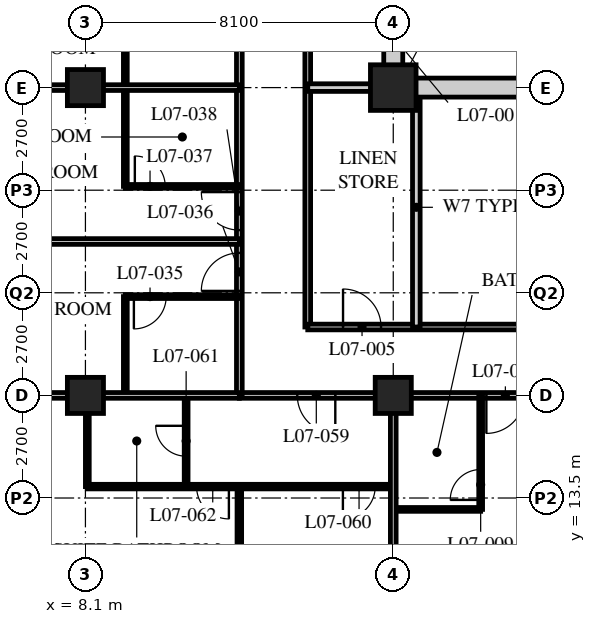
"""IFC4 building model, lengths in metres.
Left out: names, types, materials, properties, quantities, classifications, styles, units other than length and angle.
Written with IfcOpenShell. Run it as: python <this file> out.ifc"""

import sys

from ifc_helpers import new_model, si_unit, direction, frame, frame_2d, origin, origin_2d, place, context, subcontext, project, spatial, rectangle, hollow_rectangle, extrude, element, fill, save


model = new_model("IFC4")
c1 = context("Model", 3, precision=1e-05, world=origin(), true_north=direction((0.0, 1.0)))
c2 = subcontext(c1, "Body", "Model", "MODEL_VIEW")
j1 = project(units=[si_unit("LENGTHUNIT", "METRE"), si_unit("PLANEANGLEUNIT", "RADIAN")], contexts=[c1])
p1 = place(None, origin())
s1 = spatial("IfcSite", under=j1, at=p1, CompositionType="ELEMENT")
p2 = place(p1, origin())
s2 = spatial("IfcBuilding", under=s1, at=p2, CompositionType="ELEMENT")
p3 = place(p2, frame((0.0, 0.0, 36.4)))
s3 = spatial("IfcBuildingStorey", under=s2, at=p3, CompositionType="ELEMENT", Elevation=36.4)
for number, where, z_axis, x_axis in (
    (1, (8.1, 16.2, 0.0), (0.0, 0.0, 1.0), (1.0, 0.0, 0.0)),
    (2, (8.1, 24.3, 0.0), (0.0, 0.0, 1.0), (1.0, 0.0, 0.0)),
    (3, (16.2, 16.2, 0.0), (0.0, 0.0, 1.0), (1.0, 0.0, 0.0)),
):
    element("IfcColumn", number, at=place(p3, frame(where, z_axis=z_axis, x_axis=x_axis)), inside=s3, PredefinedType="COLUMN", context=c2, shape_type="SweptSolid", body=[
        extrude(hollow_rectangle(XDim=0.95, YDim=0.95, WallThickness=0.095, at=origin_2d()), origin(), (0.0, 0.0, 1.0), 3.4),
    ])
p4 = place(p3, frame((16.2, 24.3, 0.0), z_axis=(0.0, 0.0, 1.0), x_axis=(1.0, 0.0, 0.0)))
e4 = element("IfcColumn", 4, at=p4, inside=s3, PredefinedType="COLUMN", context=c2, shape_type="SweptSolid", body=[
    extrude(hollow_rectangle(XDim=1.2, YDim=1.2, WallThickness=0.12, at=origin_2d()), origin(), (0.0, 0.0, 1.0), 3.4),
])
p5 = place(p3, frame((12.15, 16.2, 0.0), z_axis=(0.0, 0.0, 1.0), x_axis=(1.0, 0.0, 0.0)))
e5 = element("IfcWall", 5, at=p5, inside=s3, PredefinedType="PARTITIONING", context=c2, shape_type="SweptSolid", body=[
    extrude(rectangle(XDim=32.4, YDim=0.15, at=frame_2d((16.2, 0.0))), origin(), (0.0, 0.0, 1.0), 2.578),
])
p6 = place(p5, frame((6.5, 0.0, 0.0)))
e6 = element("IfcOpeningElement", 6, at=p6, cuts=e5, PredefinedType="OPENING", context=c2, shape_type="SweptSolid", body=[
    extrude(rectangle(XDim=1.0, YDim=2.1, at=frame_2d((0.5, 1.05))), frame((0.0, 0.085, 0.0), z_axis=(0.0, -1.0, 0.0), x_axis=(1.0, 0.0, 0.0)), (0.0, 0.0, 1.0), 0.17),
])
p7 = place(p5, frame((8.4, 0.0, 0.0)))
e7 = element("IfcOpeningElement", 7, at=p7, cuts=e5, PredefinedType="OPENING", context=c2, shape_type="SweptSolid", body=[
    extrude(rectangle(XDim=1.0, YDim=2.1, at=frame_2d((0.5, 1.05))), frame((0.0, 0.085, 0.0), z_axis=(0.0, -1.0, 0.0), x_axis=(1.0, 0.0, 0.0)), (0.0, 0.0, 1.0), 0.17),
])
p8 = place(p5, frame((14.6, 0.0, 0.0)))
e8 = element("IfcOpeningElement", 8, at=p8, cuts=e5, PredefinedType="OPENING", context=c2, shape_type="SweptSolid", body=[
    extrude(rectangle(XDim=1.0, YDim=2.1, at=frame_2d((0.5, 1.05))), frame((0.0, 0.085, 0.0), z_axis=(0.0, -1.0, 0.0), x_axis=(1.0, 0.0, 0.0)), (0.0, 0.0, 1.0), 0.17),
])
p9 = place(p5, frame((16.5, 0.0, 0.0)))
e9 = element("IfcOpeningElement", 9, at=p9, cuts=e5, PredefinedType="OPENING", context=c2, shape_type="SweptSolid", body=[
    extrude(rectangle(XDim=1.0, YDim=2.1, at=frame_2d((0.5, 1.05))), frame((0.0, 0.085, 0.0), z_axis=(0.0, -1.0, 0.0), x_axis=(1.0, 0.0, 0.0)), (0.0, 0.0, 1.0), 0.17),
])
p10 = place(p5, frame((23.0, 0.0, 0.0)))
e10 = element("IfcOpeningElement", 10, at=p10, cuts=e5, PredefinedType="OPENING", context=c2, shape_type="SweptSolid", body=[
    extrude(rectangle(XDim=1.0, YDim=2.1, at=frame_2d((0.5, 1.05))), frame((0.0, 0.085, 0.0), z_axis=(0.0, -1.0, 0.0), x_axis=(1.0, 0.0, 0.0)), (0.0, 0.0, 1.0), 0.17),
])
p11 = place(p5, frame((24.6, 0.0, 0.0)))
e11 = element("IfcOpeningElement", 11, at=p11, cuts=e5, PredefinedType="OPENING", context=c2, shape_type="SweptSolid", body=[
    extrude(rectangle(XDim=1.0, YDim=2.1, at=frame_2d((0.5, 1.05))), frame((0.0, 0.085, 0.0), z_axis=(0.0, -1.0, 0.0), x_axis=(1.0, 0.0, 0.0)), (0.0, 0.0, 1.0), 0.17),
])
p12 = place(p5, frame((1.525, 0.0, 0.0)))
e12 = element("IfcOpeningElement", 12, at=p12, cuts=e5, PredefinedType="OPENING", context=c2, shape_type="SweptSolid", body=[
    extrude(rectangle(XDim=1.0, YDim=2.1, at=frame_2d((0.5, 1.05))), frame((0.0, 0.085, 0.0), z_axis=(0.0, -1.0, 0.0), x_axis=(1.0, 0.0, 0.0)), (0.0, 0.0, 1.0), 0.17),
])
p13 = place(p5, frame((29.875, 0.0, 0.0)))
e13 = element("IfcOpeningElement", 13, at=p13, cuts=e5, PredefinedType="OPENING", context=c2, shape_type="SweptSolid", body=[
    extrude(rectangle(XDim=1.0, YDim=2.1, at=frame_2d((0.5, 1.05))), frame((0.0, 0.085, 0.0), z_axis=(0.0, -1.0, 0.0), x_axis=(1.0, 0.0, 0.0)), (0.0, 0.0, 1.0), 0.17),
])
p14 = place(p3, frame((12.15, 16.2, 0.0), z_axis=(0.0, 0.0, 1.0), x_axis=(0.0, 1.0, 0.0)))
e14 = element("IfcWall", 14, at=p14, inside=s3, PredefinedType="PARTITIONING", context=c2, shape_type="SweptSolid", body=[
    extrude(rectangle(XDim=26.1, YDim=0.15, at=frame_2d((13.05, 0.0))), origin(), (0.0, 0.0, 1.0), 3.19),
])
p15 = place(p14, frame((2.75, 0.0, 0.0)))
e15 = element("IfcOpeningElement", 15, at=p15, cuts=e14, PredefinedType="OPENING", context=c2, shape_type="SweptSolid", body=[
    extrude(rectangle(XDim=1.0, YDim=2.1, at=frame_2d((0.5, 1.05))), frame((0.0, 0.085, 0.0), z_axis=(0.0, -1.0, 0.0), x_axis=(1.0, 0.0, 0.0)), (0.0, 0.0, 1.0), 0.17),
])
p16 = place(p14, frame((4.35, 0.0, 0.0)))
e16 = element("IfcOpeningElement", 16, at=p16, cuts=e14, PredefinedType="OPENING", context=c2, shape_type="SweptSolid", body=[
    extrude(rectangle(XDim=1.0, YDim=2.1, at=frame_2d((0.5, 1.05))), frame((0.0, 0.085, 0.0), z_axis=(0.0, -1.0, 0.0), x_axis=(1.0, 0.0, 0.0)), (0.0, 0.0, 1.0), 0.17),
])
p17 = place(p14, frame((10.55, 0.0, 0.0)))
e17 = element("IfcOpeningElement", 17, at=p17, cuts=e14, PredefinedType="OPENING", context=c2, shape_type="SweptSolid", body=[
    extrude(rectangle(XDim=1.0, YDim=2.1, at=frame_2d((0.5, 1.05))), frame((0.0, 0.085, 0.0), z_axis=(0.0, -1.0, 0.0), x_axis=(1.0, 0.0, 0.0)), (0.0, 0.0, 1.0), 0.17),
])
p18 = place(p14, frame((12.45, 0.0, 0.0)))
e18 = element("IfcOpeningElement", 18, at=p18, cuts=e14, PredefinedType="OPENING", context=c2, shape_type="SweptSolid", body=[
    extrude(rectangle(XDim=1.0, YDim=2.1, at=frame_2d((0.5, 1.05))), frame((0.0, 0.085, 0.0), z_axis=(0.0, -1.0, 0.0), x_axis=(1.0, 0.0, 0.0)), (0.0, 0.0, 1.0), 0.17),
])
p19 = place(p14, frame((18.65, 0.0, 0.0)))
e19 = element("IfcOpeningElement", 19, at=p19, cuts=e14, PredefinedType="OPENING", context=c2, shape_type="SweptSolid", body=[
    extrude(rectangle(XDim=1.0, YDim=2.1, at=frame_2d((0.5, 1.05))), frame((0.0, 0.085, 0.0), z_axis=(0.0, -1.0, 0.0), x_axis=(1.0, 0.0, 0.0)), (0.0, 0.0, 1.0), 0.17),
])
p20 = place(p14, frame((22.65, 0.0, 0.0)))
e20 = element("IfcOpeningElement", 20, at=p20, cuts=e14, PredefinedType="OPENING", context=c2, shape_type="SweptSolid", body=[
    extrude(rectangle(XDim=1.0, YDim=2.1, at=frame_2d((0.5, 1.05))), frame((0.0, 0.085, 0.0), z_axis=(0.0, -1.0, 0.0), x_axis=(1.0, 0.0, 0.0)), (0.0, 0.0, 1.0), 0.17),
])
p21 = place(p3, frame((13.95, 40.5, 0.0), z_axis=(0.0, 0.0, 1.0), x_axis=(0.0, -1.0, 0.0)))
e21 = element("IfcWall", 21, at=p21, inside=s3, PredefinedType="PARTITIONING", context=c2, shape_type="SweptSolid", body=[
    extrude(rectangle(XDim=22.5, YDim=0.15, at=frame_2d((11.25, 0.0))), origin(), (0.0, 0.0, 1.0), 3.19),
])
p22 = place(p21, frame((11.65, 0.0, 0.0)))
e22 = element("IfcOpeningElement", 22, at=p22, cuts=e21, PredefinedType="OPENING", context=c2, shape_type="SweptSolid", body=[
    extrude(rectangle(XDim=1.0, YDim=2.1, at=frame_2d((0.5, 1.05))), frame((0.0, 0.085, 0.0), z_axis=(0.0, -1.0, 0.0), x_axis=(1.0, 0.0, 0.0)), (0.0, 0.0, 1.0), 0.17),
])
p23 = place(p21, frame((3.55, 0.0, 0.0)))
e23 = element("IfcOpeningElement", 23, at=p23, cuts=e21, PredefinedType="OPENING", context=c2, shape_type="SweptSolid", body=[
    extrude(rectangle(XDim=1.0, YDim=2.1, at=frame_2d((0.5, 1.05))), frame((0.0, 0.085, 0.0), z_axis=(0.0, -1.0, 0.0), x_axis=(1.0, 0.0, 0.0)), (0.0, 0.0, 1.0), 0.17),
])
p24 = place(p3, frame((13.95, 18.0, 0.0), z_axis=(0.0, 0.0, 1.0), x_axis=(1.0, 0.0, 0.0)))
e24 = element("IfcWall", 24, at=p24, inside=s3, PredefinedType="PARTITIONING", context=c2, shape_type="SweptSolid", body=[
    extrude(rectangle(XDim=13.19, YDim=0.15, at=frame_2d((6.595, 0.0))), origin(), (0.0, 0.0, 1.0), 3.19),
])
p25 = place(p24, frame((0.929, 0.0, 0.0)))
e25 = element("IfcOpeningElement", 25, at=p25, cuts=e24, PredefinedType="OPENING", context=c2, shape_type="SweptSolid", body=[
    extrude(rectangle(XDim=1.0, YDim=2.1, at=frame_2d((0.5, 1.05))), frame((0.0, 0.085, 0.0), z_axis=(0.0, -1.0, 0.0), x_axis=(1.0, 0.0, 0.0)), (0.0, 0.0, 1.0), 0.17),
])
p26 = place(p24, frame((7.529, 0.0, 0.0)))
e26 = element("IfcOpeningElement", 26, at=p26, cuts=e24, PredefinedType="OPENING", context=c2, shape_type="SweptSolid", body=[
    extrude(rectangle(XDim=1.0, YDim=2.1, at=frame_2d((0.5, 1.05))), frame((0.0, 0.085, 0.0), z_axis=(0.0, -1.0, 0.0), x_axis=(1.0, 0.0, 0.0)), (0.0, 0.0, 1.0), 0.17),
])
p27 = place(p3, frame((16.807, 18.0, 0.0), z_axis=(0.0, 0.0, 1.0), x_axis=(0.0, 1.0, 0.0)))
e27 = element("IfcWall", 27, at=p27, inside=s3, PredefinedType="SOLIDWALL", context=c2, shape_type="SweptSolid", body=[
    extrude(rectangle(XDim=6.3, YDim=0.2, at=frame_2d((3.15, 0.0))), origin(), (0.0, 0.0, 1.0), 3.19),
])
p28 = place(p3, frame((13.95, 24.3, 0.0), z_axis=(0.0, 0.0, 1.0), x_axis=(1.0, 0.0, 0.0)))
e28 = element("IfcWall", 28, at=p28, inside=s3, PredefinedType="SOLIDWALL", context=c2, shape_type="SweptSolid", body=[
    extrude(rectangle(XDim=2.25, YDim=0.2, at=frame_2d((1.125, 0.0))), origin(), (0.0, 0.0, 1.0), 2.578),
])
p29 = place(p3, frame((16.2, 13.2, 0.0), z_axis=(0.0, 0.0, 1.0), x_axis=(1.0, 0.0, 0.0)))
e29 = element("IfcWall", 29, at=p29, inside=s3, PredefinedType="PARTITIONING", context=c2, shape_type="SweptSolid", body=[
    extrude(rectangle(XDim=2.3, YDim=0.1, at=frame_2d((1.15, 0.0))), origin(), (0.0, 0.0, 1.0), 3.19),
])
p30 = place(p3, frame((18.5, 16.2, 0.0), z_axis=(0.0, 0.0, 1.0), x_axis=(0.0, -1.0, 0.0)))
e30 = element("IfcWall", 30, at=p30, inside=s3, PredefinedType="PARTITIONING", context=c2, shape_type="SweptSolid", body=[
    extrude(rectangle(XDim=3.0, YDim=0.1, at=frame_2d((1.5, 0.0))), origin(), (0.0, 0.0, 1.0), 3.19),
])
p31 = place(p30, frame((1.95, 0.0, 0.0)))
e31 = element("IfcOpeningElement", 31, at=p31, cuts=e30, PredefinedType="OPENING", context=c2, shape_type="SweptSolid", body=[
    extrude(rectangle(XDim=0.8, YDim=2.1, at=frame_2d((0.4, 1.05))), frame((0.0, 0.06, 0.0), z_axis=(0.0, -1.0, 0.0), x_axis=(1.0, 0.0, 0.0)), (0.0, 0.0, 1.0), 0.12),
])
p32 = place(p3, frame((9.15, 16.2, 0.0), z_axis=(0.0, 0.0, 1.0), x_axis=(0.0, 1.0, 0.0)))
e32 = element("IfcWall", 32, at=p32, inside=s3, PredefinedType="PARTITIONING", context=c2, shape_type="SweptSolid", body=[
    extrude(rectangle(XDim=2.6, YDim=0.1, at=frame_2d((1.3, 0.0))), origin(), (0.0, 0.0, 1.0), 3.19),
])
p33 = place(p3, frame((12.15, 18.8, 0.0), z_axis=(0.0, 0.0, 1.0), x_axis=(-1.0, 0.0, 0.0)))
e33 = element("IfcWall", 33, at=p33, inside=s3, PredefinedType="PARTITIONING", context=c2, shape_type="SweptSolid", body=[
    extrude(rectangle(XDim=3.0, YDim=0.1, at=frame_2d((1.5, 0.0))), origin(), (0.0, 0.0, 1.0), 3.19),
])
p34 = place(p33, frame((1.925, 0.0, 0.0)))
e34 = element("IfcOpeningElement", 34, at=p34, cuts=e33, PredefinedType="OPENING", context=c2, shape_type="SweptSolid", body=[
    extrude(rectangle(XDim=0.85, YDim=2.1, at=frame_2d((0.425, 1.05))), frame((0.0, 0.06, 0.0), z_axis=(0.0, -1.0, 0.0), x_axis=(1.0, 0.0, 0.0)), (0.0, 0.0, 1.0), 0.12),
])
p35 = place(p3, frame((12.15, 20.25, 0.0), z_axis=(0.0, 0.0, 1.0), x_axis=(-1.0, 0.0, 0.0)))
e35 = element("IfcWall", 35, at=p35, inside=s3, PredefinedType="PARTITIONING", context=c2, shape_type="SweptSolid", body=[
    extrude(rectangle(XDim=11.85, YDim=0.15, at=frame_2d((5.925, 0.0))), origin(), (0.0, 0.0, 1.0), 3.19),
])
p36 = place(p3, frame((9.15, 21.7, 0.0), z_axis=(0.0, 0.0, 1.0), x_axis=(0.0, 1.0, 0.0)))
e36 = element("IfcWall", 36, at=p36, inside=s3, PredefinedType="PARTITIONING", context=c2, shape_type="SweptSolid", body=[
    extrude(rectangle(XDim=4.9, YDim=0.1, at=frame_2d((2.45, 0.0))), origin(), (0.0, 0.0, 1.0), 3.19),
])
p37 = place(p3, frame((12.15, 21.7, 0.0), z_axis=(0.0, 0.0, 1.0), x_axis=(-1.0, 0.0, 0.0)))
e37 = element("IfcWall", 37, at=p37, inside=s3, PredefinedType="PARTITIONING", context=c2, shape_type="SweptSolid", body=[
    extrude(rectangle(XDim=3.0, YDim=0.1, at=frame_2d((1.5, 0.0))), origin(), (0.0, 0.0, 1.0), 3.19),
])
p38 = place(p37, frame((1.95, 0.0, 0.0)))
e38 = element("IfcOpeningElement", 38, at=p38, cuts=e37, PredefinedType="OPENING", context=c2, shape_type="SweptSolid", body=[
    extrude(rectangle(XDim=0.8, YDim=2.1, at=frame_2d((0.4, 1.05))), frame((0.0, 0.06, 0.0), z_axis=(0.0, -1.0, 0.0), x_axis=(1.0, 0.0, 0.0)), (0.0, 0.0, 1.0), 0.12),
])
p39 = place(p3, frame((12.15, 24.3, 0.0), z_axis=(0.0, 0.0, 1.0), x_axis=(-1.0, 0.0, 0.0)))
e39 = element("IfcWall", 39, at=p39, inside=s3, PredefinedType="PARTITIONING", context=c2, shape_type="SweptSolid", body=[
    extrude(rectangle(XDim=11.85, YDim=0.15, at=frame_2d((5.925, 0.0))), origin(), (0.0, 0.0, 1.0), 2.578),
])
p40 = place(p3, frame((10.75, 16.2, 0.0), z_axis=(0.0, 0.0, 1.0), x_axis=(0.0, -1.0, 0.0)))
e40 = element("IfcWall", 40, at=p40, inside=s3, PredefinedType="PARTITIONING", context=c2, shape_type="SweptSolid", body=[
    extrude(rectangle(XDim=2.4, YDim=0.1, at=frame_2d((1.2, 0.0))), origin(), (0.0, 0.0, 1.0), 3.19),
])
p41 = place(p40, frame((0.8, 0.0, 0.0)))
e41 = element("IfcOpeningElement", 41, at=p41, cuts=e40, PredefinedType="OPENING", context=c2, shape_type="SweptSolid", body=[
    extrude(rectangle(XDim=0.8, YDim=2.1, at=frame_2d((0.4, 1.05))), frame((0.0, 0.06, 0.0), z_axis=(0.0, -1.0, 0.0), x_axis=(1.0, 0.0, 0.0)), (0.0, 0.0, 1.0), 0.12),
])
p42 = place(p3, frame((8.15, 16.2, 0.0), z_axis=(0.0, 0.0, 1.0), x_axis=(0.0, -1.0, 0.0)))
e42 = element("IfcWall", 42, at=p42, inside=s3, PredefinedType="PARTITIONING", context=c2, shape_type="SweptSolid", body=[
    extrude(rectangle(XDim=2.4, YDim=0.1, at=frame_2d((1.2, 0.0))), origin(), (0.0, 0.0, 1.0), 2.578),
])
p43 = place(p3, frame((8.15, 13.8, 0.0), z_axis=(0.0, 0.0, 1.0), x_axis=(1.0, 0.0, 0.0)))
e43 = element("IfcWall", 43, at=p43, inside=s3, PredefinedType="PARTITIONING", context=c2, shape_type="SweptSolid", body=[
    extrude(rectangle(XDim=8.05, YDim=0.12, at=frame_2d((4.025, 0.0))), origin(), (0.0, 0.0, 1.0), 3.19),
])
p44 = place(p43, frame((6.725, 0.0, 0.0)))
e44 = element("IfcOpeningElement", 44, at=p44, cuts=e43, PredefinedType="OPENING", context=c2, shape_type="SweptSolid", body=[
    extrude(rectangle(XDim=0.85, YDim=2.1, at=frame_2d((0.425, 1.05))), frame((0.0, 0.07, 0.0), z_axis=(0.0, -1.0, 0.0), x_axis=(1.0, 0.0, 0.0)), (0.0, 0.0, 1.0), 0.14),
])
p45 = place(p43, frame((2.875, 0.0, 0.0)))
e45 = element("IfcOpeningElement", 45, at=p45, cuts=e43, PredefinedType="OPENING", context=c2, shape_type="SweptSolid", body=[
    extrude(rectangle(XDim=0.85, YDim=2.1, at=frame_2d((0.425, 1.05))), frame((0.0, 0.07, 0.0), z_axis=(0.0, -1.0, 0.0), x_axis=(1.0, 0.0, 0.0)), (0.0, 0.0, 1.0), 0.14),
])
p46 = place(p3, frame((12.15, 13.8, 0.0), z_axis=(0.0, 0.0, 1.0), x_axis=(0.0, -1.0, 0.0)))
e46 = element("IfcWall", 46, at=p46, inside=s3, PredefinedType="PARTITIONING", context=c2, shape_type="SweptSolid", body=[
    extrude(rectangle(XDim=13.5, YDim=0.12, at=frame_2d((6.75, 0.0))), origin(), (0.0, 0.0, 1.0), 3.19),
])
p47 = place(p3, frame((0.3, 16.2, 0.0), z_axis=(0.0, 0.0, 1.0), x_axis=(1.0, 0.0, 0.0)))
e47 = element("IfcWall", 47, at=p47, inside=s3, PredefinedType="PARTITIONING", context=c2, shape_type="SweptSolid", body=[
    extrude(rectangle(XDim=11.85, YDim=0.15, at=frame_2d((5.925, 0.0))), origin(), (0.0, 0.0, 1.0), 2.578),
])
p48 = place(p3, frame((16.2, 16.2, 0.0), z_axis=(0.0, 0.0, 1.0), x_axis=(0.0, -1.0, 0.0)))
e48 = element("IfcWall", 48, at=p48, inside=s3, PredefinedType="PARTITIONING", context=c2, shape_type="SweptSolid", body=[
    extrude(rectangle(XDim=15.9, YDim=0.15, at=frame_2d((7.95, 0.0))), origin(), (0.0, 0.0, 1.0), 2.578),
])
p49 = place(p3, frame((15.95, 24.3, 0.0), z_axis=(0.0, 0.0, 1.0), x_axis=(1.0, 0.0, 0.0)))
e49 = element("IfcWall", 49, at=p49, inside=s3, PredefinedType="SOLIDWALL", context=c2, shape_type="SweptSolid", body=[
    extrude(rectangle(XDim=24.8, YDim=0.5, at=frame_2d((12.4, 0.0))), origin(), (0.0, 0.0, 1.0), 2.54),
])
p50 = place(p49, frame((11.5, 0.0, 0.0)))
e50 = element("IfcOpeningElement", 50, at=p50, cuts=e49, PredefinedType="OPENING", context=c2, shape_type="SweptSolid", body=[
    extrude(rectangle(XDim=1.8, YDim=2.4, at=frame_2d((0.9, 1.2))), frame((0.0, 0.26, 0.0), z_axis=(0.0, -1.0, 0.0), x_axis=(1.0, 0.0, 0.0)), (0.0, 0.0, 1.0), 0.52),
])
p51 = place(p3, frame((16.2, 24.55, 0.0), z_axis=(0.0, 0.0, 1.0), x_axis=(0.0, 1.0, 0.0)))
e51 = element("IfcWall", 51, at=p51, inside=s3, PredefinedType="SOLIDWALL", context=c2, shape_type="SweptSolid", body=[
    extrude(rectangle(XDim=15.7, YDim=0.5, at=frame_2d((7.85, 0.0))), origin(), (0.0, 0.0, 1.0), 2.578),
])
p52 = place(p25, origin())
e52 = element("IfcDoor", 52, at=p52, inside=s3, OperationType="SINGLE_SWING_LEFT", PredefinedType="DOOR", context=c2, shape_type="SweptSolid", body=[
    extrude(rectangle(XDim=1.0, YDim=2.1, at=frame_2d((0.5, 1.05))), frame((0.0, 0.025, 0.0), z_axis=(0.0, -1.0, 0.0), x_axis=(1.0, 0.0, 0.0)), (0.0, 0.0, 1.0), 0.05),
])
fill(e25, e52)
p53 = place(p31, origin())
e53 = element("IfcDoor", 53, at=p53, inside=s3, OperationType="SINGLE_SWING_LEFT", PredefinedType="DOOR", context=c2, shape_type="SweptSolid", body=[
    extrude(rectangle(XDim=0.8, YDim=2.1, at=frame_2d((0.4, 1.05))), frame((0.0, 0.025, 0.0), z_axis=(0.0, -1.0, 0.0), x_axis=(1.0, 0.0, 0.0)), (0.0, 0.0, 1.0), 0.05),
])
fill(e31, e53)
p54 = place(p6, origin())
e54 = element("IfcDoor", 54, at=p54, inside=s3, OperationType="SINGLE_SWING_RIGHT", PredefinedType="DOOR", context=c2, shape_type="SweptSolid", body=[
    extrude(rectangle(XDim=1.0, YDim=2.1, at=frame_2d((0.5, 1.05))), frame((0.0, 0.025, 0.0), z_axis=(0.0, -1.0, 0.0), x_axis=(1.0, 0.0, 0.0)), (0.0, 0.0, 1.0), 0.05),
])
fill(e6, e54)
p55 = place(p34, origin())
e55 = element("IfcDoor", 55, at=p55, inside=s3, OperationType="SINGLE_SWING_RIGHT", PredefinedType="DOOR", context=c2, shape_type="SweptSolid", body=[
    extrude(rectangle(XDim=0.85, YDim=2.1, at=frame_2d((0.425, 1.05))), frame((0.0, 0.025, 0.0), z_axis=(0.0, -1.0, 0.0), x_axis=(1.0, 0.0, 0.0)), (0.0, 0.0, 1.0), 0.05),
])
fill(e34, e55)
p56 = place(p15, origin())
e56 = element("IfcDoor", 56, at=p56, inside=s3, OperationType="SINGLE_SWING_LEFT", PredefinedType="DOOR", context=c2, shape_type="SweptSolid", body=[
    extrude(rectangle(XDim=1.0, YDim=2.1, at=frame_2d((0.5, 1.05))), frame((0.0, 0.025, 0.0), z_axis=(0.0, -1.0, 0.0), x_axis=(1.0, 0.0, 0.0)), (0.0, 0.0, 1.0), 0.05),
])
fill(e15, e56)
p57 = place(p38, origin())
e57 = element("IfcDoor", 57, at=p57, inside=s3, OperationType="SINGLE_SWING_LEFT", PredefinedType="DOOR", context=c2, shape_type="SweptSolid", body=[
    extrude(rectangle(XDim=0.8, YDim=2.1, at=frame_2d((0.4, 1.05))), frame((0.0, 0.025, 0.0), z_axis=(0.0, -1.0, 0.0), x_axis=(1.0, 0.0, 0.0)), (0.0, 0.0, 1.0), 0.05),
])
fill(e38, e57)
p58 = place(p16, origin())
e58 = element("IfcDoor", 58, at=p58, inside=s3, OperationType="SINGLE_SWING_RIGHT", PredefinedType="DOOR", context=c2, shape_type="SweptSolid", body=[
    extrude(rectangle(XDim=1.0, YDim=2.1, at=frame_2d((0.5, 1.05))), frame((0.0, 0.025, 0.0), z_axis=(0.0, -1.0, 0.0), x_axis=(1.0, 0.0, 0.0)), (0.0, 0.0, 1.0), 0.05),
])
fill(e16, e58)
p59 = place(p12, origin())
e59 = element("IfcDoor", 59, at=p59, inside=s3, OperationType="SINGLE_SWING_LEFT", PredefinedType="DOOR", context=c2, shape_type="SweptSolid", body=[
    extrude(rectangle(XDim=1.0, YDim=2.1, at=frame_2d((0.5, 1.05))), frame((0.0, 0.025, 0.0), z_axis=(0.0, -1.0, 0.0), x_axis=(1.0, 0.0, 0.0)), (0.0, 0.0, 1.0), 0.05),
])
fill(e12, e59)
p60 = place(p44, origin())
e60 = element("IfcDoor", 60, at=p60, inside=s3, OperationType="SINGLE_SWING_RIGHT", PredefinedType="DOOR", context=c2, shape_type="SweptSolid", body=[
    extrude(rectangle(XDim=0.85, YDim=2.1, at=frame_2d((0.425, 1.05))), frame((0.0, 0.025, 0.0), z_axis=(0.0, -1.0, 0.0), x_axis=(1.0, 0.0, 0.0)), (0.0, 0.0, 1.0), 0.05),
])
fill(e44, e60)
p61 = place(p41, origin())
e61 = element("IfcDoor", 61, at=p61, inside=s3, OperationType="SINGLE_SWING_RIGHT", PredefinedType="DOOR", context=c2, shape_type="SweptSolid", body=[
    extrude(rectangle(XDim=0.8, YDim=2.1, at=frame_2d((0.4, 1.05))), frame((0.0, 0.025, 0.0), z_axis=(0.0, -1.0, 0.0), x_axis=(1.0, 0.0, 0.0)), (0.0, 0.0, 1.0), 0.05),
])
fill(e41, e61)
p62 = place(p45, origin())
e62 = element("IfcDoor", 62, at=p62, inside=s3, OperationType="SINGLE_SWING_LEFT", PredefinedType="DOOR", context=c2, shape_type="SweptSolid", body=[
    extrude(rectangle(XDim=0.85, YDim=2.1, at=frame_2d((0.425, 1.05))), frame((0.0, 0.025, 0.0), z_axis=(0.0, -1.0, 0.0), x_axis=(1.0, 0.0, 0.0)), (0.0, 0.0, 1.0), 0.05),
])
fill(e45, e62)
save(model, sys.argv[1])
